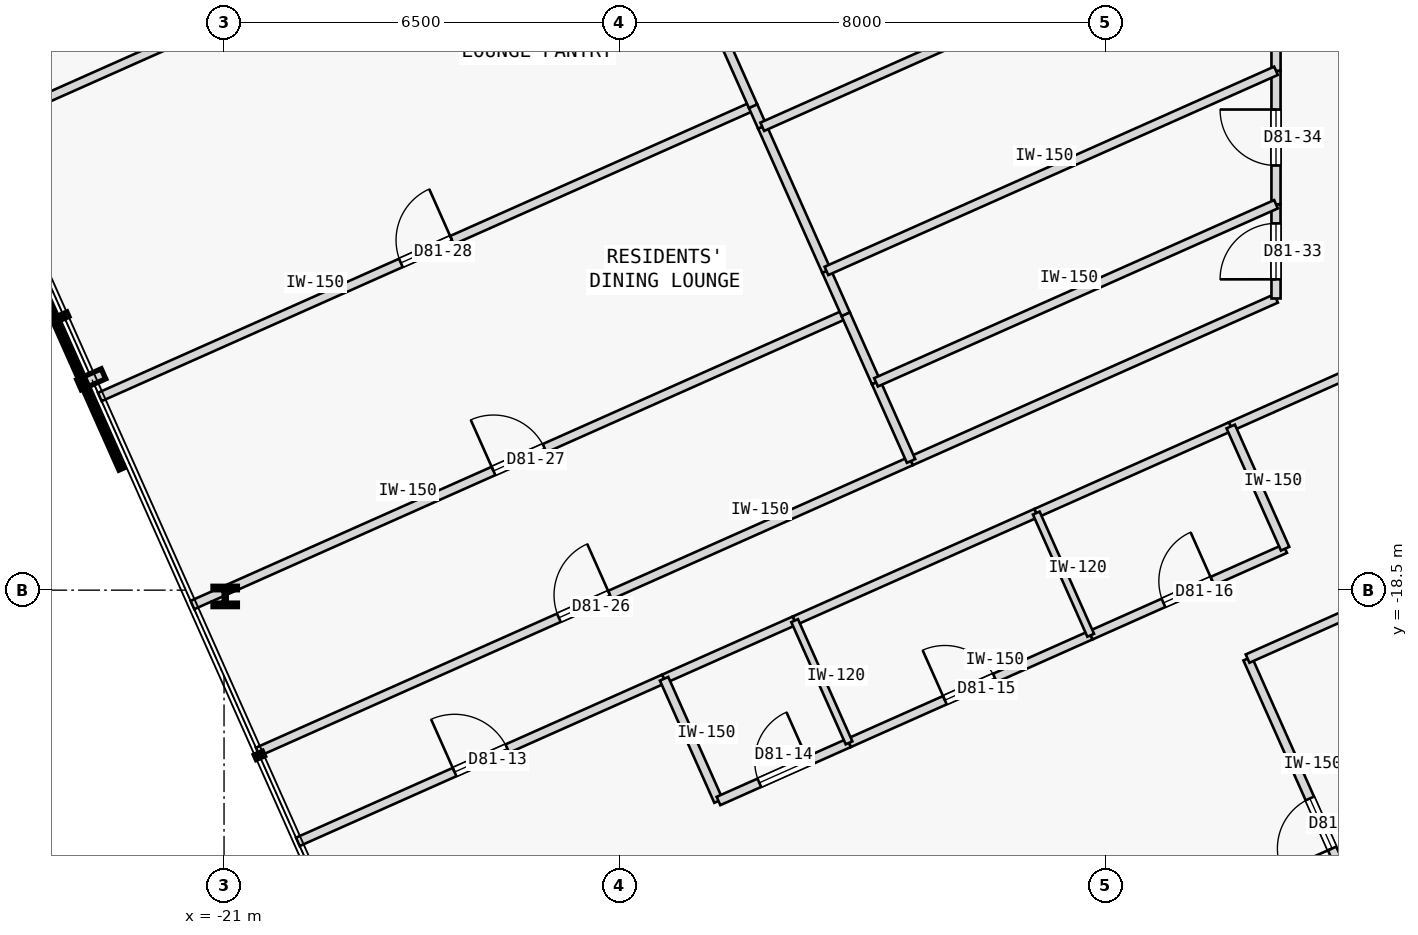
"""IFC4 building model, lengths in metres.
Left out: names, types, materials, properties, quantities, classifications, styles, units other than length and angle.
Written with IfcOpenShell. Run it as: python <this file> out.ifc"""

import sys

from ifc_helpers import new_model, si_unit, direction, frame, frame_2d, origin, origin_2d, place, context, subcontext, project, spatial, rectangle, i_section, extrude, element, fill, save


model = new_model("IFC4")
c1 = context("Model", 3, precision=1e-05, world=origin(), true_north=direction((0.0, 1.0)))
c2 = subcontext(c1, "Body", "Model", "MODEL_VIEW")
j1 = project(units=[si_unit("LENGTHUNIT", "METRE"), si_unit("PLANEANGLEUNIT", "RADIAN")], contexts=[c1])
p1 = place(None, origin())
s1 = spatial("IfcSite", under=j1, at=p1, CompositionType="ELEMENT")
p2 = place(p1, origin())
s2 = spatial("IfcBuilding", under=s1, at=p2, CompositionType="ELEMENT")
p3 = place(p2, frame((0.0, 0.0, 302.0)))
s3 = spatial("IfcBuildingStorey", under=s2, at=p3, CompositionType="ELEMENT", Elevation=302.0)
p4 = place(p3, frame((-20.981, -18.603, 0.0), z_axis=(0.0, 0.0, 1.0), x_axis=(1.0, 0.0, 0.0)))
e1 = element("IfcColumn", 1, at=p4, inside=s3, PredefinedType="COLUMN", context=c2, shape_type="SweptSolid", body=[
    extrude(i_section(OverallWidth=0.401, OverallDepth=0.335, WebThickness=0.036, FlangeThickness=0.058, FilletRadius=0.015, at=origin_2d()), origin(), (0.0, 0.0, 1.0), 3.55),
])
p5 = place(p3, frame((-19.786, -22.639, 0.0), z_axis=(0.0, 0.0, 1.0), x_axis=(0.913548717067, 0.406729322211, 0.0)))
e2 = element("IfcWall", 2, at=p5, inside=s3, PredefinedType="PARTITIONING", context=c2, shape_type="SweptSolid", body=[
    extrude(rectangle(XDim=6.593, YDim=0.15, at=frame_2d((3.297, 0.0))), origin(), (0.0, 0.0, 1.0), 3.145),
])
p6 = place(p5, frame((2.822, 0.0, 0.0)))
e3 = element("IfcOpeningElement", 3, at=p6, cuts=e2, PredefinedType="OPENING", context=c2, shape_type="SweptSolid", body=[
    extrude(rectangle(XDim=0.95, YDim=2.04, at=frame_2d((0.475, 1.02))), frame((0.0, 0.085, 0.0), z_axis=(0.0, -1.0, 0.0), x_axis=(1.0, 0.0, 0.0)), (0.0, 0.0, 1.0), 0.17),
])
p7 = place(p3, frame((-4.445, -15.808, 0.0), z_axis=(0.0, 0.0, 1.0), x_axis=(0.913546853922, 0.406733506966, 0.0)))
e4 = element("IfcWall", 4, at=p7, inside=s3, PredefinedType="PARTITIONING", context=c2, shape_type="SweptSolid", body=[
    extrude(rectangle(XDim=12.751, YDim=0.15, at=frame_2d((6.375, 0.0))), origin(), (0.0, 0.0, 1.0), 3.145),
])
p8 = place(p3, frame((-13.763, -19.957, 0.0), z_axis=(0.0, 0.0, 1.0), x_axis=(0.913541436194, 0.406745675276, 0.0)))
e5 = element("IfcWall", 5, at=p8, inside=s3, PredefinedType="PARTITIONING", context=c2, shape_type="SweptSolid", body=[
    extrude(rectangle(XDim=2.35, YDim=0.15, at=frame_2d((1.175, 0.0))), origin(), (0.0, 0.0, 1.0), 3.145),
])
p9 = place(p3, frame((-11.616, -19.001, 0.0), z_axis=(0.0, 0.0, 1.0), x_axis=(0.913545193015, 0.406737237438, 0.0)))
e6 = element("IfcWall", 6, at=p9, inside=s3, PredefinedType="PARTITIONING", context=c2, shape_type="SweptSolid", body=[
    extrude(rectangle(XDim=4.35, YDim=0.15, at=frame_2d((2.175, 0.0))), origin(), (0.0, 0.0, 1.0), 3.145),
])
p10 = place(p3, frame((-7.643, -17.232, 0.0), z_axis=(0.0, 0.0, 1.0), x_axis=(0.913549606868, 0.406727323635, 0.0)))
e7 = element("IfcWall", 7, at=p10, inside=s3, PredefinedType="PARTITIONING", context=c2, shape_type="SweptSolid", body=[
    extrude(rectangle(XDim=3.5, YDim=0.15, at=frame_2d((1.75, 0.0))), origin(), (0.0, 0.0, 1.0), 3.145),
])
p11 = place(p3, frame((-20.445, -21.159, 0.0), z_axis=(0.0, 0.0, 1.0), x_axis=(0.913547681516, 0.406731648137, 0.0)))
e8 = element("IfcWall", 8, at=p11, inside=s3, PredefinedType="PARTITIONING", context=c2, shape_type="SweptSolid", body=[
    extrude(rectangle(XDim=11.76, YDim=0.15, at=frame_2d((5.88, 0.0))), origin(), (0.0, 0.0, 1.0), 3.145),
])
p12 = place(p11, frame((5.42, 0.0, 0.0)))
e9 = element("IfcOpeningElement", 9, at=p12, cuts=e8, PredefinedType="OPENING", context=c2, shape_type="SweptSolid", body=[
    extrude(rectangle(XDim=0.92, YDim=2.04, at=frame_2d((0.46, 1.02))), frame((0.0, 0.085, 0.0), z_axis=(0.0, -1.0, 0.0), x_axis=(1.0, 0.0, 0.0)), (0.0, 0.0, 1.0), 0.17),
])
p13 = place(p3, frame((-9.702, -16.375, 0.0), z_axis=(0.0, 0.0, 1.0), x_axis=(0.913552389019, 0.406721074594, 0.0)))
e10 = element("IfcWall", 10, at=p13, inside=s3, PredefinedType="PARTITIONING", context=c2, shape_type="SweptSolid", body=[
    extrude(rectangle(XDim=6.57, YDim=0.15, at=frame_2d((3.285, 0.0))), origin(), (0.0, 0.0, 1.0), 3.145),
])
p14 = place(p3, frame((-3.7, -13.703, 0.0), z_axis=(0.0, 0.0, 1.0), x_axis=(-0.000157529929, 0.999999987592, 0.0)))
e11 = element("IfcWall", 11, at=p14, inside=s3, PredefinedType="PARTITIONING", context=c2, shape_type="SweptSolid", body=[
    extrude(rectangle(XDim=1.55, YDim=0.15, at=frame_2d((0.775, 0.0))), origin(), (0.0, 0.0, 1.0), 3.145),
])
p15 = place(p14, frame((0.315, 0.0, 0.0)))
e12 = element("IfcOpeningElement", 12, at=p15, cuts=e11, PredefinedType="OPENING", context=c2, shape_type="SweptSolid", body=[
    extrude(rectangle(XDim=0.92, YDim=2.04, at=frame_2d((0.46, 1.02))), frame((0.0, 0.085, 0.0), z_axis=(0.0, -1.0, 0.0), x_axis=(1.0, 0.0, 0.0)), (0.0, 0.0, 1.0), 0.17),
])
p16 = place(p3, frame((-3.7, -12.154, 0.0), z_axis=(0.0, 0.0, 1.0), x_axis=(0.000111222333, 0.999999993815, 0.0)))
e13 = element("IfcWall", 13, at=p16, inside=s3, PredefinedType="PARTITIONING", context=c2, shape_type="SweptSolid", body=[
    extrude(rectangle(XDim=2.195, YDim=0.15, at=frame_2d((1.098, 0.0))), origin(), (0.0, 0.0, 1.0), 3.145),
])
p17 = place(p16, frame((0.637, 0.0, 0.0)))
e14 = element("IfcOpeningElement", 14, at=p17, cuts=e13, PredefinedType="OPENING", context=c2, shape_type="SweptSolid", body=[
    extrude(rectangle(XDim=0.92, YDim=2.04, at=frame_2d((0.46, 1.02))), frame((0.0, 0.085, 0.0), z_axis=(0.0, -1.0, 0.0), x_axis=(1.0, 0.0, 0.0)), (0.0, 0.0, 1.0), 0.17),
])
p18 = place(p3, frame((-3.7, -9.958, 0.0), z_axis=(0.0, 0.0, 1.0), x_axis=(-0.000171909917, 0.999999985223, 0.0)))
e15 = element("IfcWall", 15, at=p18, inside=s3, PredefinedType="PARTITIONING", context=c2, shape_type="SweptSolid", body=[
    extrude(rectangle(XDim=2.84, YDim=0.15, at=frame_2d((1.42, 0.0))), origin(), (0.0, 0.0, 1.0), 3.145),
])
p19 = place(p18, frame((0.96, 0.0, 0.0)))
e16 = element("IfcOpeningElement", 16, at=p19, cuts=e15, PredefinedType="OPENING", context=c2, shape_type="SweptSolid", body=[
    extrude(rectangle(XDim=0.92, YDim=2.04, at=frame_2d((0.46, 1.02))), frame((0.0, 0.085, 0.0), z_axis=(0.0, -1.0, 0.0), x_axis=(1.0, 0.0, 0.0)), (0.0, 0.0, 1.0), 0.17),
])
p20 = place(p3, frame((-12.868, -21.967, 0.0), z_axis=(0.0, 0.0, 1.0), x_axis=(-0.406725294076, 0.913550510459, 0.0)))
e17 = element("IfcWall", 17, at=p20, inside=s3, PredefinedType="PARTITIONING", context=c2, shape_type="SweptSolid", body=[
    extrude(rectangle(XDim=2.2, YDim=0.15, at=frame_2d((1.1, 0.0))), origin(), (0.0, 0.0, 1.0), 3.145),
])
p21 = place(p3, frame((-12.868, -21.967, 0.0), z_axis=(0.0, 0.0, 1.0), x_axis=(0.913541436194, 0.406745675276, 0.0)))
e18 = element("IfcWall", 18, at=p21, inside=s3, PredefinedType="PARTITIONING", context=c2, shape_type="SweptSolid", body=[
    extrude(rectangle(XDim=2.35, YDim=0.15, at=frame_2d((1.175, 0.0))), origin(), (0.0, 0.0, 1.0), 3.145),
])
p22 = place(p21, frame((0.735, 0.0, 0.0)))
e19 = element("IfcOpeningElement", 19, at=p22, cuts=e18, PredefinedType="OPENING", context=c2, shape_type="SweptSolid", body=[
    extrude(rectangle(XDim=0.88, YDim=2.04, at=frame_2d((0.44, 1.02))), frame((0.0, 0.085, 0.0), z_axis=(0.0, -1.0, 0.0), x_axis=(1.0, 0.0, 0.0)), (0.0, 0.0, 1.0), 0.17),
])
p23 = place(p3, frame((-10.722, -21.011, 0.0), z_axis=(0.0, 0.0, 1.0), x_axis=(0.913545193015, 0.406737237438, 0.0)))
e20 = element("IfcWall", 20, at=p23, inside=s3, PredefinedType="PARTITIONING", context=c2, shape_type="SweptSolid", body=[
    extrude(rectangle(XDim=4.35, YDim=0.15, at=frame_2d((2.175, 0.0))), origin(), (0.0, 0.0, 1.0), 3.145),
])
p24 = place(p23, frame((1.725, 0.0, 0.0)))
e21 = element("IfcOpeningElement", 21, at=p24, cuts=e20, PredefinedType="OPENING", context=c2, shape_type="SweptSolid", body=[
    extrude(rectangle(XDim=0.9, YDim=2.04, at=frame_2d((0.45, 1.02))), frame((0.0, 0.085, 0.0), z_axis=(0.0, -1.0, 0.0), x_axis=(1.0, 0.0, 0.0)), (0.0, 0.0, 1.0), 0.17),
])
p25 = place(p3, frame((-6.748, -19.242, 0.0), z_axis=(0.0, 0.0, 1.0), x_axis=(0.913549606868, 0.406727323635, 0.0)))
e22 = element("IfcWall", 22, at=p25, inside=s3, PredefinedType="PARTITIONING", context=c2, shape_type="SweptSolid", body=[
    extrude(rectangle(XDim=3.5, YDim=0.15, at=frame_2d((1.75, 0.0))), origin(), (0.0, 0.0, 1.0), 3.145),
])
p26 = place(p25, frame((1.31, 0.0, 0.0)))
e23 = element("IfcOpeningElement", 23, at=p26, cuts=e22, PredefinedType="OPENING", context=c2, shape_type="SweptSolid", body=[
    extrude(rectangle(XDim=0.88, YDim=2.04, at=frame_2d((0.44, 1.02))), frame((0.0, 0.085, 0.0), z_axis=(0.0, -1.0, 0.0), x_axis=(1.0, 0.0, 0.0)), (0.0, 0.0, 1.0), 0.17),
])
p27 = place(p3, frame((-3.55, -17.818, 0.0), z_axis=(0.0, 0.0, 1.0), x_axis=(-0.406725294076, 0.913550510459, 0.0)))
e24 = element("IfcWall", 24, at=p27, inside=s3, PredefinedType="PARTITIONING", context=c2, shape_type="SweptSolid", body=[
    extrude(rectangle(XDim=2.2, YDim=0.15, at=frame_2d((1.1, 0.0))), origin(), (0.0, 0.0, 1.0), 3.145),
])
p28 = place(p3, frame((-1.754, -25.047, 0.0), z_axis=(0.0, 0.0, 1.0), x_axis=(-0.406714717734, 0.913555219119, 0.0)))
e25 = element("IfcWall", 25, at=p28, inside=s3, PredefinedType="PARTITIONING", context=c2, shape_type="SweptSolid", body=[
    extrude(rectangle(XDim=5.935, YDim=0.15, at=frame_2d((2.967, 0.0))), origin(), (0.0, 0.0, 1.0), 3.145),
])
p29 = place(p28, frame((2.518, 0.0, 0.0)))
e26 = element("IfcOpeningElement", 26, at=p29, cuts=e25, PredefinedType="OPENING", context=c2, shape_type="SweptSolid", body=[
    extrude(rectangle(XDim=0.9, YDim=2.04, at=frame_2d((0.45, 1.02))), frame((0.0, 0.085, 0.0), z_axis=(0.0, -1.0, 0.0), x_axis=(1.0, 0.0, 0.0)), (0.0, 0.0, 1.0), 0.17),
])
p30 = place(p3, frame((-4.167, -19.625, 0.0), z_axis=(0.0, 0.0, 1.0), x_axis=(0.913536363976, 0.406757067172, 0.0)))
e27 = element("IfcWall", 27, at=p30, inside=s3, PredefinedType="PARTITIONING", context=c2, shape_type="SweptSolid", body=[
    extrude(rectangle(XDim=4.65, YDim=0.15, at=frame_2d((2.325, 0.0))), origin(), (0.0, 0.0, 1.0), 3.145),
])
for number, where, z_axis, x_axis in (
    (28, (-10.722, -21.011, 0.0), (0.0, 0.0, 1.0), (-0.407, 0.914, 0.0)),
    (29, (-6.748, -19.242, 0.0), (0.0, 0.0, 1.0), (-0.407, 0.914, 0.0)),
):
    element("IfcWall", number, at=place(p3, frame(where, z_axis=z_axis, x_axis=x_axis)), inside=s3, PredefinedType="PARTITIONING", context=c2, shape_type="SweptSolid", body=[
        extrude(rectangle(XDim=2.2, YDim=0.12, at=frame_2d((1.1, 0.0))), origin(), (0.0, 0.0, 1.0), 3.145),
    ])
p31 = place(p3, frame((-21.52, -18.744, 0.0), z_axis=(0.0, 0.0, 1.0), x_axis=(0.913539967617, 0.406748973651, 0.0)))
e30 = element("IfcWall", 30, at=p31, inside=s3, PredefinedType="PARTITIONING", context=c2, shape_type="SweptSolid", body=[
    extrude(rectangle(XDim=11.76, YDim=0.15, at=frame_2d((5.88, 0.0))), origin(), (0.0, 0.0, 1.0), 3.145),
])
p32 = place(p31, frame((5.42, 0.0, 0.0)))
e31 = element("IfcOpeningElement", 31, at=p32, cuts=e30, PredefinedType="OPENING", context=c2, shape_type="SweptSolid", body=[
    extrude(rectangle(XDim=0.92, YDim=2.04, at=frame_2d((0.46, 1.02))), frame((0.0, 0.085, 0.0), z_axis=(0.0, -1.0, 0.0), x_axis=(1.0, 0.0, 0.0)), (0.0, 0.0, 1.0), 0.17),
])
p33 = place(p3, frame((-9.702, -16.375, 0.0), z_axis=(0.0, 0.0, 1.0), x_axis=(-0.406762319034, 0.913534025537, 0.0)))
e32 = element("IfcWall", 32, at=p33, inside=s3, PredefinedType="PARTITIONING", context=c2, shape_type="SweptSolid", body=[
    extrude(rectangle(XDim=1.416, YDim=0.15, at=frame_2d((0.708, 0.0))), origin(), (0.0, 0.0, 1.0), 3.145),
])
p34 = place(p3, frame((-10.278, -15.082, 0.0), z_axis=(0.0, 0.0, 1.0), x_axis=(-0.406655262741, 0.913581686159, 0.0)))
e33 = element("IfcWall", 33, at=p34, inside=s3, PredefinedType="PARTITIONING", context=c2, shape_type="SweptSolid", body=[
    extrude(rectangle(XDim=1.227, YDim=0.15, at=frame_2d((0.614, 0.0))), origin(), (0.0, 0.0, 1.0), 3.145),
])
p35 = place(p3, frame((-23.043, -15.323, 0.0), z_axis=(0.0, 0.0, 1.0), x_axis=(0.913547681516, 0.406731648137, 0.0)))
e34 = element("IfcWall", 34, at=p35, inside=s3, PredefinedType="PARTITIONING", context=c2, shape_type="SweptSolid", body=[
    extrude(rectangle(XDim=11.76, YDim=0.15, at=frame_2d((5.88, 0.0))), origin(), (0.0, 0.0, 1.0), 3.145),
])
p36 = place(p35, frame((5.42, 0.0, 0.0)))
e35 = element("IfcOpeningElement", 35, at=p36, cuts=e34, PredefinedType="OPENING", context=c2, shape_type="SweptSolid", body=[
    extrude(rectangle(XDim=0.92, YDim=2.04, at=frame_2d((0.46, 1.02))), frame((0.0, 0.085, 0.0), z_axis=(0.0, -1.0, 0.0), x_axis=(1.0, 0.0, 0.0)), (0.0, 0.0, 1.0), 0.17),
])
p37 = place(p3, frame((-10.777, -13.961, 0.0), z_axis=(0.0, 0.0, 1.0), x_axis=(-0.406720744325, 0.913552536057, 0.0)))
e36 = element("IfcWall", 36, at=p37, inside=s3, PredefinedType="PARTITIONING", context=c2, shape_type="SweptSolid", body=[
    extrude(rectangle(XDim=0.778, YDim=0.15, at=frame_2d((0.389, 0.0))), origin(), (0.0, 0.0, 1.0), 3.145),
])
p38 = place(p3, frame((-11.093, -13.25, 0.0), z_axis=(0.0, 0.0, 1.0), x_axis=(-0.406723252866, 0.91355141923, 0.0)))
e37 = element("IfcWall", 37, at=p38, inside=s3, PredefinedType="PARTITIONING", context=c2, shape_type="SweptSolid", body=[
    extrude(rectangle(XDim=2.595, YDim=0.15, at=frame_2d((1.297, 0.0))), origin(), (0.0, 0.0, 1.0), 3.145),
])
p39 = place(p3, frame((-12.149, -10.88, 0.0), z_axis=(0.0, 0.0, 1.0), x_axis=(-0.406868995548, 0.913486519037, 0.0)))
e38 = element("IfcWall", 38, at=p39, inside=s3, PredefinedType="PARTITIONING", context=c2, shape_type="SweptSolid", body=[
    extrude(rectangle(XDim=0.372, YDim=0.15, at=frame_2d((0.186, 0.0))), origin(), (0.0, 0.0, 1.0), 3.145),
])
p40 = place(p3, frame((-25.014, -10.896, 0.0), z_axis=(0.0, 0.0, 1.0), x_axis=(0.913544247064, 0.406739362069, 0.0)))
e39 = element("IfcWall", 39, at=p40, inside=s3, PredefinedType="PARTITIONING", context=c2, shape_type="SweptSolid", body=[
    extrude(rectangle(XDim=11.76, YDim=0.15, at=frame_2d((5.88, 0.0))), origin(), (0.0, 0.0, 1.0), 3.145),
])
p41 = place(p40, frame((5.42, 0.0, 0.0)))
e40 = element("IfcOpeningElement", 40, at=p41, cuts=e39, PredefinedType="OPENING", context=c2, shape_type="SweptSolid", body=[
    extrude(rectangle(XDim=0.92, YDim=2.04, at=frame_2d((0.46, 1.02))), frame((0.0, 0.085, 0.0), z_axis=(0.0, -1.0, 0.0), x_axis=(1.0, 0.0, 0.0)), (0.0, 0.0, 1.0), 0.17),
])
p42 = place(p3, frame((-12.3, -10.54, 0.0), z_axis=(0.0, 0.0, 1.0), x_axis=(-0.406788806475, 0.913522231216, 0.0)))
e41 = element("IfcWall", 41, at=p42, inside=s3, PredefinedType="PARTITIONING", context=c2, shape_type="SweptSolid", body=[
    extrude(rectangle(XDim=2.577, YDim=0.15, at=frame_2d((1.289, 0.0))), origin(), (0.0, 0.0, 1.0), 3.145),
])
p43 = place(p3, frame((-10.278, -15.082, 0.0), z_axis=(0.0, 0.0, 1.0), x_axis=(0.913549882956, 0.406726703513, 0.0)))
e42 = element("IfcWall", 42, at=p43, inside=s3, PredefinedType="PARTITIONING", context=c2, shape_type="SweptSolid", body=[
    extrude(rectangle(XDim=7.2, YDim=0.15, at=frame_2d((3.6, 0.0))), origin(), (0.0, 0.0, 1.0), 3.145),
])
p44 = place(p3, frame((-11.093, -13.25, 0.0), z_axis=(0.0, 0.0, 1.0), x_axis=(0.913543891457, 0.406740160767, 0.0)))
e43 = element("IfcWall", 43, at=p44, inside=s3, PredefinedType="PARTITIONING", context=c2, shape_type="SweptSolid", body=[
    extrude(rectangle(XDim=8.093, YDim=0.15, at=frame_2d((4.046, 0.0))), origin(), (0.0, 0.0, 1.0), 3.145),
])
p45 = place(p3, frame((-12.149, -10.88, 0.0), z_axis=(0.0, 0.0, 1.0), x_axis=(0.913542450291, 0.406743397631, 0.0)))
e44 = element("IfcWall", 44, at=p45, inside=s3, PredefinedType="PARTITIONING", context=c2, shape_type="SweptSolid", body=[
    extrude(rectangle(XDim=9.248, YDim=0.15, at=frame_2d((4.624, 0.0))), origin(), (0.0, 0.0, 1.0), 3.145),
])
p46 = place(p6, origin())
e45 = element("IfcDoor", 45, at=p46, inside=s3, OperationType="SINGLE_SWING_LEFT", PredefinedType="DOOR", context=c2, shape_type="SweptSolid", body=[
    extrude(rectangle(XDim=0.95, YDim=2.04, at=frame_2d((0.475, 1.02))), frame((0.0, 0.025, 0.0), z_axis=(0.0, -1.0, 0.0), x_axis=(1.0, 0.0, 0.0)), (0.0, 0.0, 1.0), 0.05),
])
fill(e3, e45)
p47 = place(p22, origin())
e46 = element("IfcDoor", 46, at=p47, inside=s3, OperationType="SINGLE_SWING_RIGHT", PredefinedType="DOOR", context=c2, shape_type="SweptSolid", body=[
    extrude(rectangle(XDim=0.88, YDim=2.04, at=frame_2d((0.44, 1.02))), frame((0.0, 0.025, 0.0), z_axis=(0.0, -1.0, 0.0), x_axis=(1.0, 0.0, 0.0)), (0.0, 0.0, 1.0), 0.05),
])
fill(e19, e46)
p48 = place(p24, origin())
e47 = element("IfcDoor", 47, at=p48, inside=s3, OperationType="SINGLE_SWING_LEFT", PredefinedType="DOOR", context=c2, shape_type="SweptSolid", body=[
    extrude(rectangle(XDim=0.9, YDim=2.04, at=frame_2d((0.45, 1.02))), frame((0.0, 0.025, 0.0), z_axis=(0.0, -1.0, 0.0), x_axis=(1.0, 0.0, 0.0)), (0.0, 0.0, 1.0), 0.05),
])
fill(e21, e47)
p49 = place(p26, origin())
e48 = element("IfcDoor", 48, at=p49, inside=s3, OperationType="SINGLE_SWING_RIGHT", PredefinedType="DOOR", context=c2, shape_type="SweptSolid", body=[
    extrude(rectangle(XDim=0.88, YDim=2.04, at=frame_2d((0.44, 1.02))), frame((0.0, 0.025, 0.0), z_axis=(0.0, -1.0, 0.0), x_axis=(1.0, 0.0, 0.0)), (0.0, 0.0, 1.0), 0.05),
])
fill(e23, e48)
p50 = place(p29, origin())
e49 = element("IfcDoor", 49, at=p50, inside=s3, OperationType="SINGLE_SWING_LEFT", PredefinedType="DOOR", context=c2, shape_type="SweptSolid", body=[
    extrude(rectangle(XDim=0.9, YDim=2.04, at=frame_2d((0.45, 1.02))), frame((0.0, 0.025, 0.0), z_axis=(0.0, -1.0, 0.0), x_axis=(1.0, 0.0, 0.0)), (0.0, 0.0, 1.0), 0.05),
])
fill(e26, e49)
p51 = place(p12, origin())
e50 = element("IfcDoor", 50, at=p51, inside=s3, OperationType="SINGLE_SWING_RIGHT", PredefinedType="DOOR", context=c2, shape_type="SweptSolid", body=[
    extrude(rectangle(XDim=0.92, YDim=2.04, at=frame_2d((0.46, 1.02))), frame((0.0, 0.025, 0.0), z_axis=(0.0, -1.0, 0.0), x_axis=(1.0, 0.0, 0.0)), (0.0, 0.0, 1.0), 0.05),
])
fill(e9, e50)
p52 = place(p32, origin())
e51 = element("IfcDoor", 51, at=p52, inside=s3, OperationType="SINGLE_SWING_LEFT", PredefinedType="DOOR", context=c2, shape_type="SweptSolid", body=[
    extrude(rectangle(XDim=0.92, YDim=2.04, at=frame_2d((0.46, 1.02))), frame((0.0, 0.025, 0.0), z_axis=(0.0, -1.0, 0.0), x_axis=(1.0, 0.0, 0.0)), (0.0, 0.0, 1.0), 0.05),
])
fill(e31, e51)
p53 = place(p36, origin())
e52 = element("IfcDoor", 52, at=p53, inside=s3, OperationType="SINGLE_SWING_RIGHT", PredefinedType="DOOR", context=c2, shape_type="SweptSolid", body=[
    extrude(rectangle(XDim=0.92, YDim=2.04, at=frame_2d((0.46, 1.02))), frame((0.0, 0.025, 0.0), z_axis=(0.0, -1.0, 0.0), x_axis=(1.0, 0.0, 0.0)), (0.0, 0.0, 1.0), 0.05),
])
fill(e35, e52)
p54 = place(p15, origin())
e53 = element("IfcDoor", 53, at=p54, inside=s3, OperationType="SINGLE_SWING_LEFT", PredefinedType="DOOR", context=c2, shape_type="SweptSolid", body=[
    extrude(rectangle(XDim=0.92, YDim=2.04, at=frame_2d((0.46, 1.02))), frame((0.0, 0.025, 0.0), z_axis=(0.0, -1.0, 0.0), x_axis=(1.0, 0.0, 0.0)), (0.0, 0.0, 1.0), 0.05),
])
fill(e12, e53)
p55 = place(p17, origin())
e54 = element("IfcDoor", 54, at=p55, inside=s3, OperationType="SINGLE_SWING_RIGHT", PredefinedType="DOOR", context=c2, shape_type="SweptSolid", body=[
    extrude(rectangle(XDim=0.92, YDim=2.04, at=frame_2d((0.46, 1.02))), frame((0.0, 0.025, 0.0), z_axis=(0.0, -1.0, 0.0), x_axis=(1.0, 0.0, 0.0)), (0.0, 0.0, 1.0), 0.05),
])
fill(e14, e54)
save(model, sys.argv[1])
